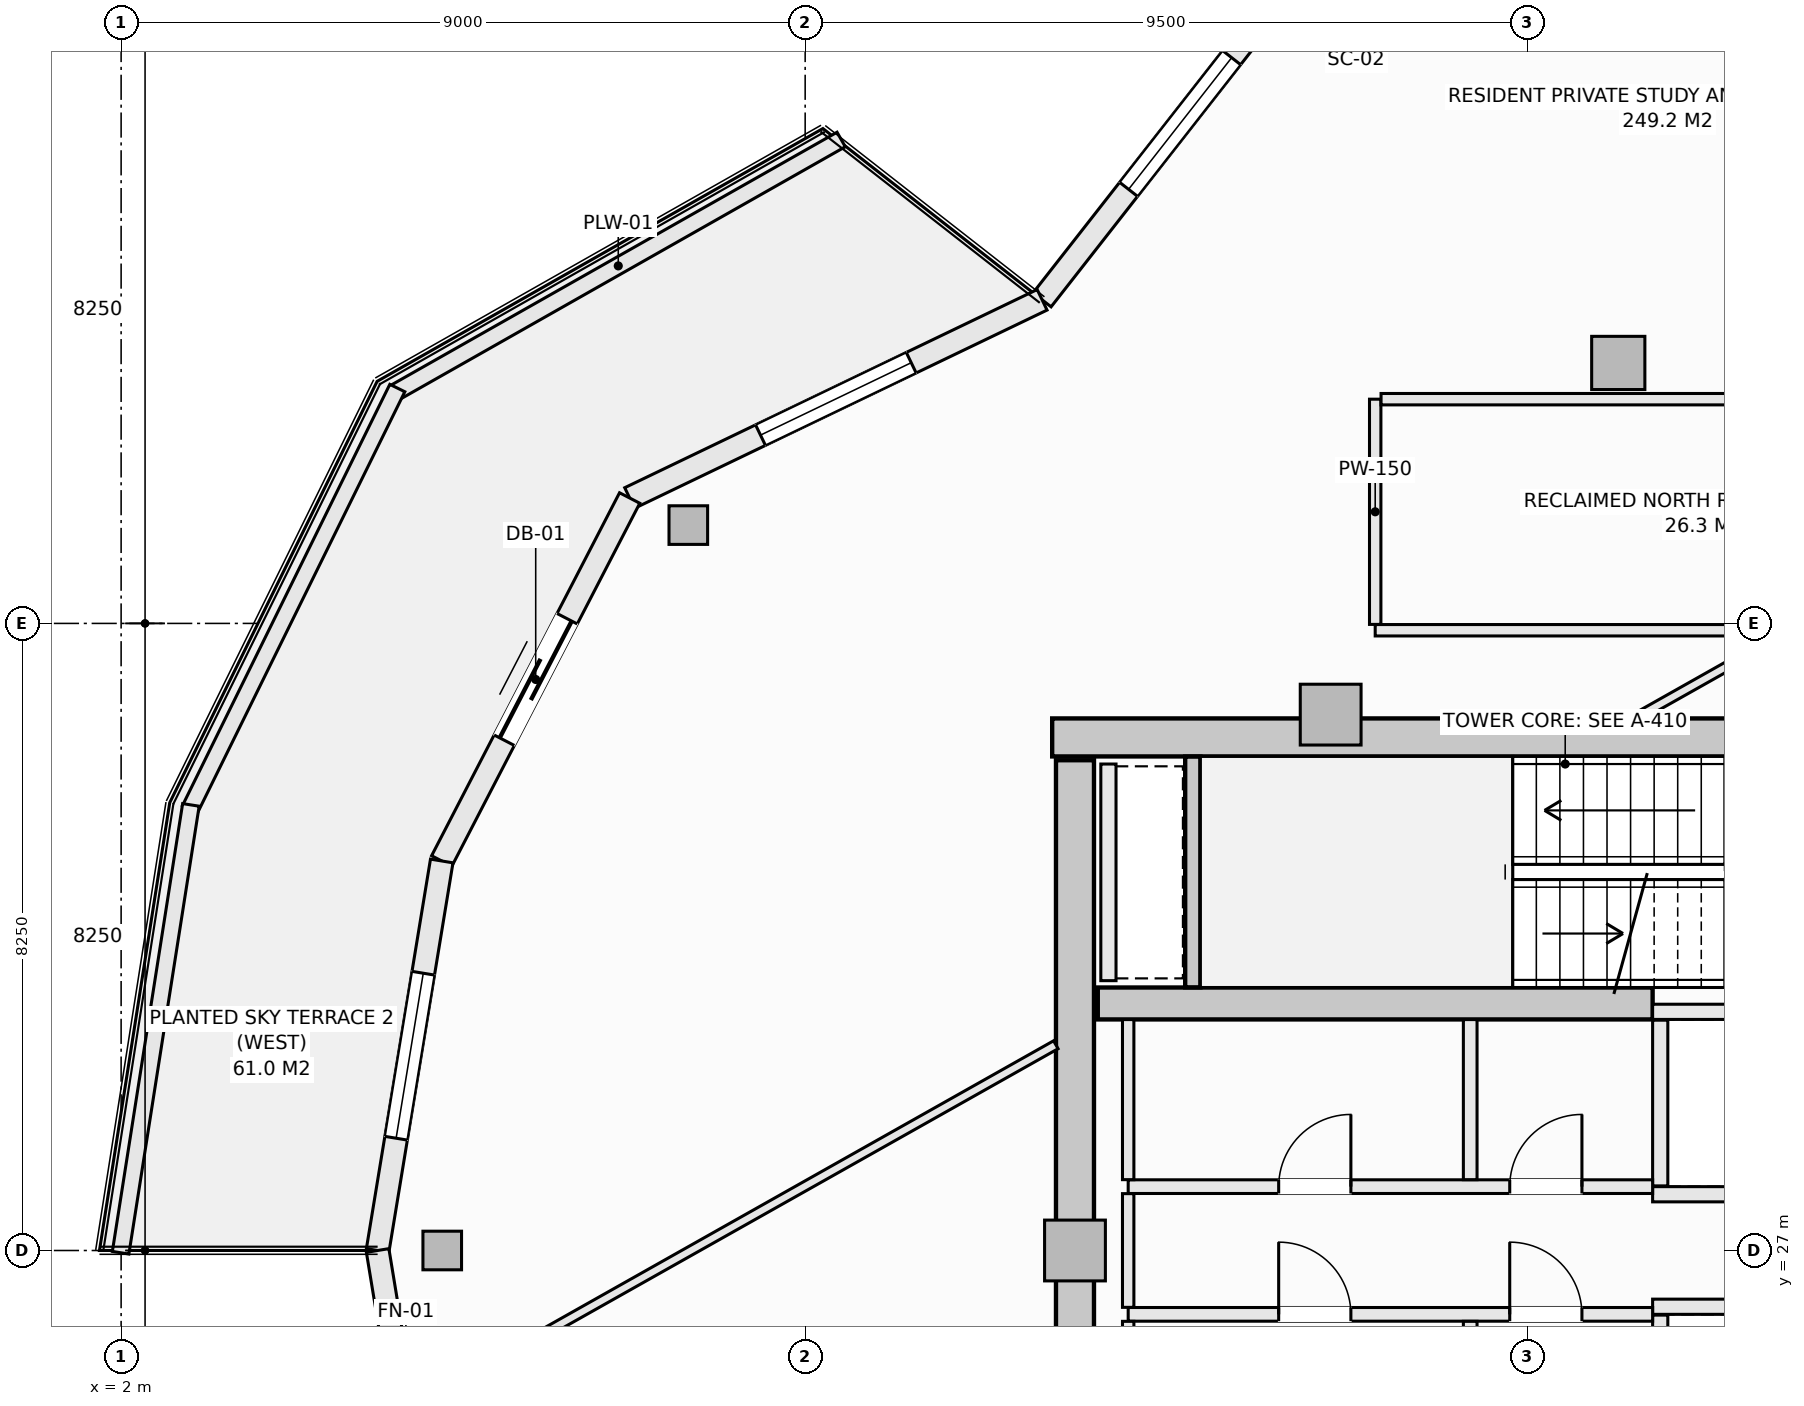
"""IFC4 building model, lengths in metres.
Left out: names, types, materials, properties, quantities, classifications, styles, units other than length and angle.
Written with IfcOpenShell. Run it as: python <this file> out.ifc"""

import sys

from ifc_helpers import new_model, si_unit, direction, frame, frame_2d, origin, origin_2d, place, context, subcontext, project, spatial, rectangle, hollow_rectangle, extrude, element, fill, save


model = new_model("IFC4")
c1 = context("Model", 3, precision=1e-05, world=origin(), true_north=direction((0.0, 1.0)))
c2 = subcontext(c1, "Body", "Model", "MODEL_VIEW")
j1 = project(units=[si_unit("LENGTHUNIT", "METRE"), si_unit("PLANEANGLEUNIT", "RADIAN")], contexts=[c1])
p1 = place(None, origin())
s1 = spatial("IfcSite", under=j1, at=p1, CompositionType="ELEMENT")
p2 = place(p1, origin())
s2 = spatial("IfcBuilding", under=s1, at=p2, CompositionType="ELEMENT")
p3 = place(p2, frame((0.0, 0.0, 196.4)))
s3 = spatial("IfcBuildingStorey", under=s2, at=p3, CompositionType="ELEMENT", Elevation=196.4)
p4 = place(p3, frame((14.25, 33.75, -0.27), z_axis=(0.0, 0.0, 1.0), x_axis=(1.0, 0.0, 0.0)))
e1 = element("IfcWall", 1, at=p4, inside=s3, PredefinedType="SHEAR", context=c2, shape_type="SweptSolid", body=[
    extrude(rectangle(XDim=13.5, YDim=0.5, at=frame_2d((6.75, 0.0))), origin(), (0.0, 0.0, 1.0), 3.3),
])
p5 = place(p3, frame((14.55, 20.55, -0.27), z_axis=(0.0, 0.0, 1.0), x_axis=(0.0, 1.0, 0.0)))
e2 = element("IfcWall", 2, at=p5, inside=s3, PredefinedType="SHEAR", context=c2, shape_type="SweptSolid", body=[
    extrude(rectangle(XDim=12.9, YDim=0.5, at=frame_2d((6.45, 0.0))), origin(), (0.0, 0.0, 1.0), 3.3),
])
p6 = place(p3, frame((14.85, 30.25, -0.27), z_axis=(0.0, 0.0, 1.0), x_axis=(1.0, 0.0, 0.0)))
e3 = element("IfcWall", 3, at=p6, inside=s3, PredefinedType="SHEAR", context=c2, shape_type="SweptSolid", body=[
    extrude(rectangle(XDim=7.3, YDim=0.42, at=frame_2d((3.65, 0.0))), origin(), (0.0, 0.0, 1.0), 3.3),
])
for number, where, z_axis, x_axis in (
    (4, (9.463, 36.544, -0.27), (0.0, 0.0, 1.0), (1.0, 0.0, 0.0)),
    (5, (6.225, 27.0, -0.27), (0.0, 0.0, 1.0), (1.0, 0.0, 0.0)),
):
    element("IfcColumn", number, at=place(p3, frame(where, z_axis=z_axis, x_axis=x_axis)), inside=s3, PredefinedType="COLUMN", context=c2, shape_type="SweptSolid", body=[
        extrude(hollow_rectangle(XDim=0.508, YDim=0.508, WallThickness=0.019, at=origin_2d()), origin(), (0.0, 0.0, 1.0), 3.3),
    ])
p7 = place(p3, frame((21.698, 38.677, -0.27), z_axis=(0.0, 0.0, 1.0), x_axis=(1.0, 0.0, 0.0)))
e6 = element("IfcColumn", 6, at=p7, inside=s3, PredefinedType="COLUMN", context=c2, shape_type="SweptSolid", body=[
    extrude(rectangle(XDim=0.7, YDim=0.7, at=origin_2d()), origin(), (0.0, 0.0, 1.0), 3.3),
])
for number, where, z_axis, x_axis in (
    (7, (17.914, 34.05, -0.27), (0.0, 0.0, 1.0), (1.0, 0.0, 0.0)),
    (8, (14.55, 27.0, -0.27), (0.0, 0.0, 1.0), (1.0, 0.0, 0.0)),
):
    element("IfcColumn", number, at=place(p3, frame(where, z_axis=z_axis, x_axis=x_axis)), inside=s3, PredefinedType="PILASTER", context=c2, shape_type="SweptSolid", body=[
        extrude(rectangle(XDim=0.8, YDim=0.8, at=origin_2d()), origin(), (0.0, 0.0, 1.0), 3.3),
    ])
p8 = place(p3, frame((14.117, 39.507, 0.0), z_axis=(0.0, 0.0, 1.0), x_axis=(0.616450126935, 0.787393955401, 0.0)))
e9 = element("IfcWall", 9, at=p8, inside=s3, PredefinedType="SOLIDWALL", context=c2, shape_type="SweptSolid", body=[
    extrude(rectangle(XDim=5.893, YDim=0.3, at=frame_2d((2.946, 0.0))), origin(), (0.0, 0.0, 1.0), 2.605),
])
p9 = place(p8, frame((1.846, 0.0, 0.72)))
e10 = element("IfcOpeningElement", 10, at=p9, cuts=e9, PredefinedType="OPENING", context=c2, shape_type="SweptSolid", body=[
    extrude(rectangle(XDim=2.2, YDim=1.65, at=frame_2d((1.1, 0.825))), frame((0.0, 0.16, 0.0), z_axis=(0.0, -1.0, 0.0), x_axis=(1.0, 0.0, 0.0)), (0.0, 0.0, 1.0), 0.32),
])
p10 = place(p3, frame((8.691, 36.9, 0.0), z_axis=(0.0, 0.0, 1.0), x_axis=(0.901348331142, 0.433094892545, 0.0)))
e11 = element("IfcWall", 11, at=p10, inside=s3, PredefinedType="SOLIDWALL", context=c2, shape_type="SweptSolid", body=[
    extrude(rectangle(XDim=6.021, YDim=0.3, at=frame_2d((3.01, 0.0))), origin(), (0.0, 0.0, 1.0), 2.605),
])
p11 = place(p10, frame((1.91, 0.0, 0.72)))
e12 = element("IfcOpeningElement", 12, at=p11, cuts=e11, PredefinedType="OPENING", context=c2, shape_type="SweptSolid", body=[
    extrude(rectangle(XDim=2.2, YDim=1.65, at=frame_2d((1.1, 0.825))), frame((0.0, 0.16, 0.0), z_axis=(0.0, -1.0, 0.0), x_axis=(1.0, 0.0, 0.0)), (0.0, 0.0, 1.0), 0.32),
])
p12 = place(p3, frame((6.218, 32.125, 0.0), z_axis=(0.0, 0.0, 1.0), x_axis=(0.459808219482, 0.888018243786, 0.0)))
e13 = element("IfcWall", 13, at=p12, inside=s3, PredefinedType="SOLIDWALL", context=c2, shape_type="SweptSolid", body=[
    extrude(rectangle(XDim=5.378, YDim=0.3, at=frame_2d((2.689, 0.0))), origin(), (0.0, 0.0, 1.0), 2.605),
])
p13 = place(p12, frame((1.789, 0.0, 0.0)))
e14 = element("IfcOpeningElement", 14, at=p13, cuts=e13, PredefinedType="OPENING", context=c2, shape_type="SweptSolid", body=[
    extrude(rectangle(XDim=1.8, YDim=2.25, at=frame_2d((0.9, 1.125))), frame((0.0, 0.16, 0.0), z_axis=(0.0, -1.0, 0.0), x_axis=(1.0, 0.0, 0.0)), (0.0, 0.0, 1.0), 0.32),
])
p14 = place(p3, frame((5.375, 27.0, 0.0), z_axis=(0.0, 0.0, 1.0), x_axis=(0.16237087798, 0.986729799886, 0.0)))
e15 = element("IfcWall", 15, at=p14, inside=s3, PredefinedType="SOLIDWALL", context=c2, shape_type="SweptSolid", body=[
    extrude(rectangle(XDim=5.193, YDim=0.3, at=frame_2d((2.597, 0.0))), origin(), (0.0, 0.0, 1.0), 2.605),
])
p15 = place(p14, frame((1.497, 0.0, 0.72)))
e16 = element("IfcOpeningElement", 16, at=p15, cuts=e15, PredefinedType="OPENING", context=c2, shape_type="SweptSolid", body=[
    extrude(rectangle(XDim=2.2, YDim=1.65, at=frame_2d((1.1, 0.825))), frame((0.0, 0.16, 0.0), z_axis=(0.0, -1.0, 0.0), x_axis=(1.0, 0.0, 0.0)), (0.0, 0.0, 1.0), 0.32),
])
p16 = place(p3, frame((5.375, 27.0, 0.0), z_axis=(0.0, 0.0, 1.0), x_axis=(0.16237087798, -0.986729799886, 0.0)))
e17 = element("IfcWall", 17, at=p16, inside=s3, PredefinedType="SOLIDWALL", context=c2, shape_type="SweptSolid", body=[
    extrude(rectangle(XDim=5.193, YDim=0.3, at=frame_2d((2.597, 0.0))), origin(), (0.0, 0.0, 1.0), 2.605),
])
p17 = place(p16, frame((2.45, 0.0, 0.72)))
e18 = element("IfcOpeningElement", 18, at=p17, cuts=e17, PredefinedType="OPENING", context=c2, shape_type="SweptSolid", body=[
    extrude(rectangle(XDim=2.2, YDim=1.65, at=frame_2d((1.1, 0.825))), frame((0.0, 0.16, 0.0), z_axis=(0.0, -1.0, 0.0), x_axis=(1.0, 0.0, 0.0)), (0.0, 0.0, 1.0), 0.32),
])
p18 = place(p3, frame((5.608, 38.291, 0.0), z_axis=(0.0, 0.0, 1.0), x_axis=(0.869860619267, 0.493297580623, 0.0)))
e19 = element("IfcWall", 19, at=p18, inside=s3, PredefinedType="PARAPET", context=c2, shape_type="SweptSolid", body=[
    extrude(rectangle(XDim=6.743, YDim=0.22, at=frame_2d((3.371, 0.0))), origin(), (0.0, 0.0, 1.0), 0.52),
])
p19 = place(p3, frame((2.906, 32.804, 0.0), z_axis=(0.0, 0.0, 1.0), x_axis=(0.441640961804, 0.897191875162, 0.0)))
e20 = element("IfcWall", 20, at=p19, inside=s3, PredefinedType="PARAPET", context=c2, shape_type="SweptSolid", body=[
    extrude(rectangle(XDim=6.178, YDim=0.22, at=frame_2d((3.089, 0.0))), origin(), (0.0, 0.0, 1.0), 0.52),
])
p20 = place(p3, frame((1.993, 26.971, 0.0), z_axis=(0.0, 0.0, 1.0), x_axis=(0.1550711793, 0.987903299595, 0.0)))
e21 = element("IfcWall", 21, at=p20, inside=s3, PredefinedType="PARAPET", context=c2, shape_type="SweptSolid", body=[
    extrude(rectangle(XDim=5.964, YDim=0.22, at=frame_2d((2.982, 0.0))), origin(), (0.0, 0.0, 1.0), 0.52),
])
p21 = place(p3, frame((16.1, 30.462, -0.27), z_axis=(0.0, 0.0, 1.0), x_axis=(0.0, 1.0, 0.0)))
e22 = element("IfcWall", 22, at=p21, inside=s3, PredefinedType="SHEAR", context=c2, shape_type="SweptSolid", body=[
    extrude(rectangle(XDim=3.036, YDim=0.2, at=frame_2d((1.518, 0.0))), origin(), (0.0, 0.0, 1.0), 3.3),
])
for number, where, z_axis, x_axis in (
    (23, (22.15, 30.14, 0.0), (0.0, 0.0, 1.0), (1.0, 0.0, 0.0)),
    (24, (22.15, 27.74, 0.0), (0.0, 0.0, 1.0), (1.0, 0.0, 0.0)),
):
    element("IfcWall", number, at=place(p3, frame(where, z_axis=z_axis, x_axis=x_axis)), inside=s3, PredefinedType="SOLIDWALL", context=c2, shape_type="SweptSolid", body=[
        extrude(rectangle(XDim=2.45, YDim=0.2, at=frame_2d((1.225, 0.0))), origin(), (0.0, 0.0, 1.0), 3.03),
    ])
p22 = place(p3, frame((22.25, 27.85, 0.0), z_axis=(0.0, 0.0, 1.0), x_axis=(0.0, 1.0, 0.0)))
e25 = element("IfcWall", 25, at=p22, inside=s3, PredefinedType="SOLIDWALL", context=c2, shape_type="SweptSolid", body=[
    extrude(rectangle(XDim=2.18, YDim=0.2, at=frame_2d((1.09, 0.0))), origin(), (0.0, 0.0, 1.0), 3.03),
])
p23 = place(p3, frame((22.15, 26.26, 0.0), z_axis=(0.0, 0.0, 1.0), x_axis=(1.0, 0.0, 0.0)))
e26 = element("IfcWall", 26, at=p23, inside=s3, PredefinedType="SOLIDWALL", context=c2, shape_type="SweptSolid", body=[
    extrude(rectangle(XDim=2.45, YDim=0.2, at=frame_2d((1.225, 0.0))), origin(), (0.0, 0.0, 1.0), 3.03),
])
p24 = place(p3, frame((22.25, 23.97, 0.0), z_axis=(0.0, 0.0, 1.0), x_axis=(0.0, 1.0, 0.0)))
e27 = element("IfcWall", 27, at=p24, inside=s3, PredefinedType="SOLIDWALL", context=c2, shape_type="SweptSolid", body=[
    extrude(rectangle(XDim=2.18, YDim=0.2, at=frame_2d((1.09, 0.0))), origin(), (0.0, 0.0, 1.0), 3.03),
])
p25 = place(p3, frame((14.99, 30.55, 0.0), z_axis=(0.0, 0.0, 1.0), x_axis=(0.0, 1.0, 0.0)))
e28 = element("IfcWall", 28, at=p25, inside=s3, PredefinedType="SOLIDWALL", context=c2, shape_type="SweptSolid", body=[
    extrude(rectangle(XDim=2.85, YDim=0.2, at=frame_2d((1.425, 0.0))), origin(), (0.0, 0.0, 1.0), 3.03),
])
p26 = place(p3, frame((15.25, 27.84, 0.0), z_axis=(0.0, 0.0, 1.0), x_axis=(1.0, 0.0, 0.0)))
e29 = element("IfcWall", 29, at=p26, inside=s3, PredefinedType="SOLIDWALL", context=c2, shape_type="SweptSolid", body=[
    extrude(rectangle(XDim=6.9, YDim=0.18, at=frame_2d((3.45, 0.0))), origin(), (0.0, 0.0, 1.0), 3.03),
])
p27 = place(p26, frame((5.02, 0.0, 0.0)))
e30 = element("IfcOpeningElement", 30, at=p27, cuts=e29, PredefinedType="OPENING", context=c2, shape_type="SweptSolid", body=[
    extrude(rectangle(XDim=0.95, YDim=2.1, at=frame_2d((0.475, 1.05))), frame((0.0, 0.1, 0.0), z_axis=(0.0, -1.0, 0.0), x_axis=(1.0, 0.0, 0.0)), (0.0, 0.0, 1.0), 0.2),
])
p28 = place(p26, frame((1.98, 0.0, 0.0)))
e31 = element("IfcOpeningElement", 31, at=p28, cuts=e29, PredefinedType="OPENING", context=c2, shape_type="SweptSolid", body=[
    extrude(rectangle(XDim=0.95, YDim=2.1, at=frame_2d((0.475, 1.05))), frame((0.0, 0.1, 0.0), z_axis=(0.0, -1.0, 0.0), x_axis=(1.0, 0.0, 0.0)), (0.0, 0.0, 1.0), 0.2),
])
p29 = place(p3, frame((15.25, 26.16, 0.0), z_axis=(0.0, 0.0, 1.0), x_axis=(1.0, 0.0, 0.0)))
e32 = element("IfcWall", 32, at=p29, inside=s3, PredefinedType="SOLIDWALL", context=c2, shape_type="SweptSolid", body=[
    extrude(rectangle(XDim=6.9, YDim=0.18, at=frame_2d((3.45, 0.0))), origin(), (0.0, 0.0, 1.0), 3.03),
])
p30 = place(p29, frame((5.02, 0.0, 0.0)))
e33 = element("IfcOpeningElement", 33, at=p30, cuts=e32, PredefinedType="OPENING", context=c2, shape_type="SweptSolid", body=[
    extrude(rectangle(XDim=0.95, YDim=2.1, at=frame_2d((0.475, 1.05))), frame((0.0, 0.1, 0.0), z_axis=(0.0, -1.0, 0.0), x_axis=(1.0, 0.0, 0.0)), (0.0, 0.0, 1.0), 0.2),
])
p31 = place(p29, frame((1.98, 0.0, 0.0)))
e34 = element("IfcOpeningElement", 34, at=p31, cuts=e32, PredefinedType="OPENING", context=c2, shape_type="SweptSolid", body=[
    extrude(rectangle(XDim=0.95, YDim=2.1, at=frame_2d((0.475, 1.05))), frame((0.0, 0.1, 0.0), z_axis=(0.0, -1.0, 0.0), x_axis=(1.0, 0.0, 0.0)), (0.0, 0.0, 1.0), 0.2),
])
p32 = place(p3, frame((15.25, 23.962, 0.0), z_axis=(0.0, 0.0, 1.0), x_axis=(0.0, 1.0, 0.0)))
e35 = element("IfcWall", 35, at=p32, inside=s3, PredefinedType="PARTITIONING", context=c2, shape_type="SweptSolid", body=[
    extrude(rectangle(XDim=2.106, YDim=0.15, at=frame_2d((1.053, 0.0))), origin(), (0.0, 0.0, 1.0), 3.03),
])
p33 = place(p3, frame((15.25, 26.252, 0.0), z_axis=(0.0, 0.0, 1.0), x_axis=(0.0, 1.0, 0.0)))
e36 = element("IfcWall", 36, at=p33, inside=s3, PredefinedType="PARTITIONING", context=c2, shape_type="SweptSolid", body=[
    extrude(rectangle(XDim=1.496, YDim=0.15, at=frame_2d((0.748, 0.0))), origin(), (0.0, 0.0, 1.0), 3.03),
])
p34 = place(p3, frame((15.25, 27.932, 0.0), z_axis=(0.0, 0.0, 1.0), x_axis=(0.0, 1.0, 0.0)))
e37 = element("IfcWall", 37, at=p34, inside=s3, PredefinedType="PARTITIONING", context=c2, shape_type="SweptSolid", body=[
    extrude(rectangle(XDim=2.106, YDim=0.15, at=frame_2d((1.053, 0.0))), origin(), (0.0, 0.0, 1.0), 3.03),
])
for number, where, z_axis, x_axis in (
    (38, (19.75, 23.962, 0.0), (0.0, 0.0, 1.0), (0.0, 1.0, 0.0)),
    (39, (19.75, 27.932, 0.0), (0.0, 0.0, 1.0), (0.0, 1.0, 0.0)),
):
    element("IfcWall", number, at=place(p3, frame(where, z_axis=z_axis, x_axis=x_axis)), inside=s3, PredefinedType="SOLIDWALL", context=c2, shape_type="SweptSolid", body=[
        extrude(rectangle(XDim=2.106, YDim=0.18, at=frame_2d((1.053, 0.0))), origin(), (0.0, 0.0, 1.0), 3.03),
    ])
p35 = place(p3, frame((18.5, 35.16, 0.0), z_axis=(0.0, 0.0, 1.0), x_axis=(1.0, 0.0, 0.0)))
e40 = element("IfcWall", 40, at=p35, inside=s3, PredefinedType="PARTITIONING", context=c2, shape_type="SweptSolid", body=[
    extrude(rectangle(XDim=8.573, YDim=0.15, at=frame_2d((4.287, 0.0))), origin(), (0.0, 0.0, 1.0), 3.03),
])
p36 = place(p3, frame((18.5, 35.237, 0.0), z_axis=(0.0, 0.0, 1.0), x_axis=(0.0, 1.0, 0.0)))
e41 = element("IfcWall", 41, at=p36, inside=s3, PredefinedType="PARTITIONING", context=c2, shape_type="SweptSolid", body=[
    extrude(rectangle(XDim=2.963, YDim=0.15, at=frame_2d((1.481, 0.0))), origin(), (0.0, 0.0, 1.0), 3.03),
])
p37 = place(p3, frame((18.577, 38.2, 0.0), z_axis=(0.0, 0.0, 1.0), x_axis=(1.0, 0.0, 0.0)))
e42 = element("IfcWall", 42, at=p37, inside=s3, PredefinedType="PARTITIONING", context=c2, shape_type="SweptSolid", body=[
    extrude(rectangle(XDim=8.496, YDim=0.15, at=frame_2d((4.248, 0.0))), origin(), (0.0, 0.0, 1.0), 3.03),
])
p38 = place(p3, frame((5.866, 24.954, 0.0), z_axis=(0.0, 0.0, 1.0), x_axis=(0.871135339325, 0.491042992597, 0.0)))
e43 = element("IfcWall", 43, at=p38, inside=s3, PredefinedType="PARTITIONING", context=c2, shape_type="SweptSolid", body=[
    extrude(rectangle(XDim=9.68, YDim=0.12, at=frame_2d((4.84, 0.0))), origin(), (0.0, 0.0, 1.0), 2.478),
])
p39 = place(p3, frame((21.918, 34.002, 0.0), z_axis=(0.0, 0.0, 1.0), x_axis=(0.871124293407, 0.491062588104, 0.0)))
e44 = element("IfcWall", 44, at=p39, inside=s3, PredefinedType="PARTITIONING", context=c2, shape_type="SweptSolid", body=[
    extrude(rectangle(XDim=1.836, YDim=0.12, at=frame_2d((0.918, 0.0))), origin(), (0.0, 0.0, 1.0), 3.03),
])
p40 = place(p9, origin())
e45 = element("IfcWindow", 45, at=p40, inside=s3, PartitioningType="SINGLE_PANEL", PredefinedType="WINDOW", context=c2, shape_type="SweptSolid", body=[
    extrude(rectangle(XDim=2.2, YDim=1.65, at=frame_2d((1.1, 0.825))), frame((0.0, 0.03, 0.0), z_axis=(0.0, -1.0, 0.0), x_axis=(1.0, 0.0, 0.0)), (0.0, 0.0, 1.0), 0.06),
])
fill(e10, e45)
p41 = place(p11, origin())
e46 = element("IfcWindow", 46, at=p41, inside=s3, PartitioningType="SINGLE_PANEL", PredefinedType="WINDOW", context=c2, shape_type="SweptSolid", body=[
    extrude(rectangle(XDim=2.2, YDim=1.65, at=frame_2d((1.1, 0.825))), frame((0.0, 0.03, 0.0), z_axis=(0.0, -1.0, 0.0), x_axis=(1.0, 0.0, 0.0)), (0.0, 0.0, 1.0), 0.06),
])
fill(e12, e46)
p42 = place(p13, origin())
e47 = element("IfcDoor", 47, at=p42, inside=s3, OperationType="SLIDING_TO_LEFT", PredefinedType="DOOR", context=c2, shape_type="SweptSolid", body=[
    extrude(rectangle(XDim=1.8, YDim=2.25, at=frame_2d((0.9, 1.125))), frame((0.0, 0.025, 0.0), z_axis=(0.0, -1.0, 0.0), x_axis=(1.0, 0.0, 0.0)), (0.0, 0.0, 1.0), 0.05),
])
fill(e14, e47)
p43 = place(p15, origin())
e48 = element("IfcWindow", 48, at=p43, inside=s3, PartitioningType="SINGLE_PANEL", PredefinedType="WINDOW", context=c2, shape_type="SweptSolid", body=[
    extrude(rectangle(XDim=2.2, YDim=1.65, at=frame_2d((1.1, 0.825))), frame((0.0, 0.03, 0.0), z_axis=(0.0, -1.0, 0.0), x_axis=(1.0, 0.0, 0.0)), (0.0, 0.0, 1.0), 0.06),
])
fill(e16, e48)
p44 = place(p27, origin())
e49 = element("IfcDoor", 49, at=p44, inside=s3, OperationType="SINGLE_SWING_RIGHT", PredefinedType="DOOR", context=c2, shape_type="SweptSolid", body=[
    extrude(rectangle(XDim=0.95, YDim=2.1, at=frame_2d((0.475, 1.05))), frame((0.0, 0.025, 0.0), z_axis=(0.0, -1.0, 0.0), x_axis=(1.0, 0.0, 0.0)), (0.0, 0.0, 1.0), 0.05),
])
fill(e30, e49)
p45 = place(p30, origin())
e50 = element("IfcDoor", 50, at=p45, inside=s3, OperationType="SINGLE_SWING_LEFT", PredefinedType="DOOR", context=c2, shape_type="SweptSolid", body=[
    extrude(rectangle(XDim=0.95, YDim=2.1, at=frame_2d((0.475, 1.05))), frame((0.0, 0.025, 0.0), z_axis=(0.0, -1.0, 0.0), x_axis=(1.0, 0.0, 0.0)), (0.0, 0.0, 1.0), 0.05),
])
fill(e33, e50)
p46 = place(p28, origin())
e51 = element("IfcDoor", 51, at=p46, inside=s3, OperationType="SINGLE_SWING_RIGHT", PredefinedType="DOOR", context=c2, shape_type="SweptSolid", body=[
    extrude(rectangle(XDim=0.95, YDim=2.1, at=frame_2d((0.475, 1.05))), frame((0.0, 0.025, 0.0), z_axis=(0.0, -1.0, 0.0), x_axis=(1.0, 0.0, 0.0)), (0.0, 0.0, 1.0), 0.05),
])
fill(e31, e51)
p47 = place(p31, origin())
e52 = element("IfcDoor", 52, at=p47, inside=s3, OperationType="SINGLE_SWING_LEFT", PredefinedType="DOOR", context=c2, shape_type="SweptSolid", body=[
    extrude(rectangle(XDim=0.95, YDim=2.1, at=frame_2d((0.475, 1.05))), frame((0.0, 0.025, 0.0), z_axis=(0.0, -1.0, 0.0), x_axis=(1.0, 0.0, 0.0)), (0.0, 0.0, 1.0), 0.05),
])
fill(e34, e52)
save(model, sys.argv[1])
